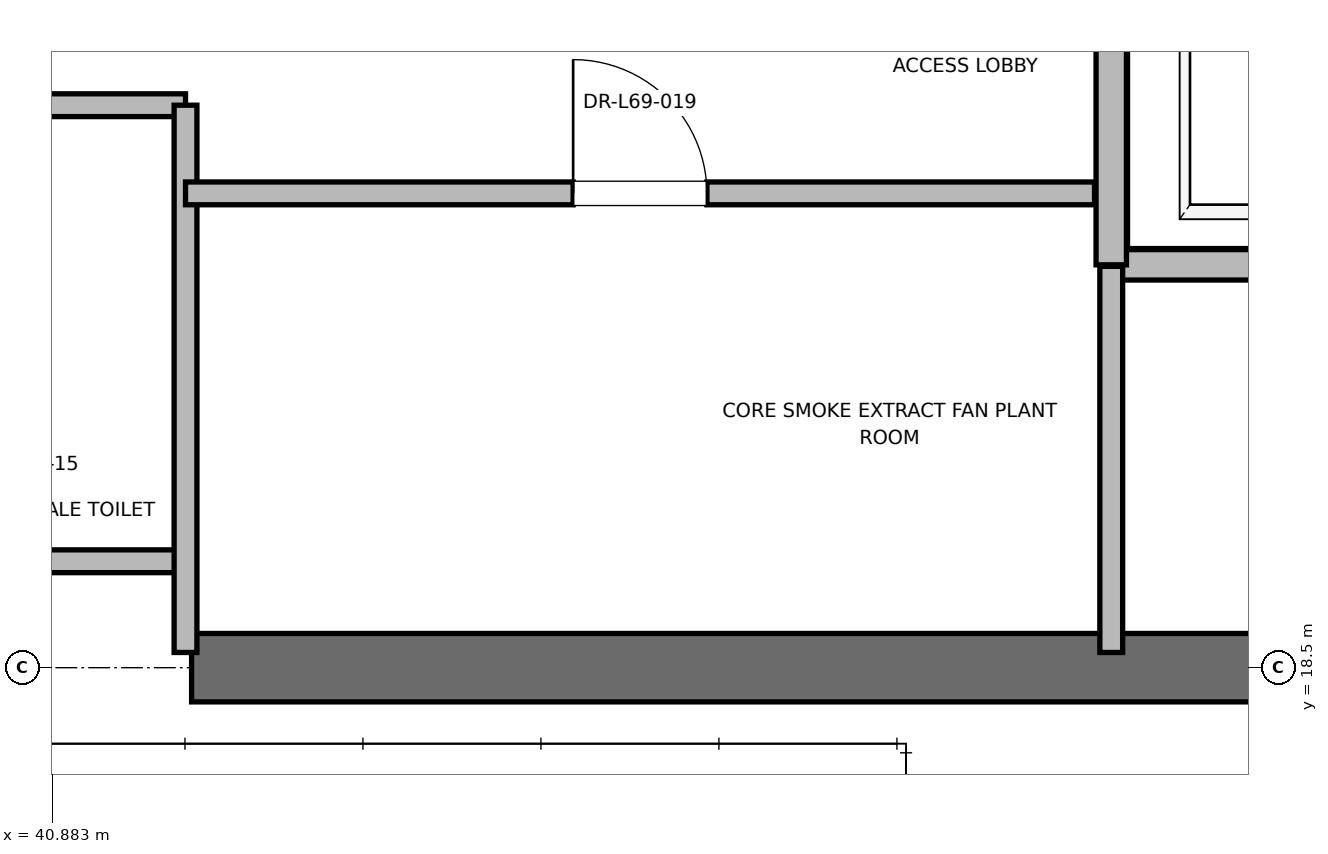
"""IFC4 building model, lengths in metres.
Left out: names, types, materials, properties, quantities, classifications, styles, units other than length and angle.
Written with IfcOpenShell. Run it as: python <this file> out.ifc"""

import sys

from ifc_helpers import new_model, si_unit, direction, frame, frame_2d, origin, place, context, subcontext, project, spatial, rectangle, extrude, element, fill, save


model = new_model("IFC4")
c1 = context("Model", 3, precision=1e-05, world=origin(), true_north=direction((0.0, 1.0)))
c2 = subcontext(c1, "Body", "Model", "MODEL_VIEW")
j1 = project(units=[si_unit("LENGTHUNIT", "METRE"), si_unit("PLANEANGLEUNIT", "RADIAN")], contexts=[c1])
p1 = place(None, origin())
s1 = spatial("IfcSite", under=j1, at=p1, CompositionType="ELEMENT")
p2 = place(p1, origin())
s2 = spatial("IfcBuilding", under=s1, at=p2, CompositionType="ELEMENT")
p3 = place(p2, frame((0.0, 0.0, 295.2)))
s3 = spatial("IfcBuildingStorey", under=s2, at=p3, CompositionType="ELEMENT", Elevation=295.2)
p4 = place(p3, frame((41.8, 18.5, 0.0), z_axis=(0.0, 0.0, 1.0), x_axis=(1.0, 0.0, 0.0)))
e1 = element("IfcWall", 1, at=p4, inside=s3, PredefinedType="SHEAR", context=c2, shape_type="SweptSolid", body=[
    extrude(rectangle(XDim=9.2, YDim=0.45, at=frame_2d((4.6, 0.0))), origin(), (0.0, 0.0, 1.0), 5.5),
])
p5 = place(p3, frame((47.85, 21.15, 0.0), z_axis=(0.0, 0.0, 1.0), x_axis=(1.0, 0.0, 0.0)))
e2 = element("IfcWall", 2, at=p5, inside=s3, PredefinedType="SOLIDWALL", context=c2, shape_type="SweptSolid", body=[
    extrude(rectangle(XDim=2.6, YDim=0.2, at=frame_2d((1.3, 0.0))), origin(), (0.0, 0.0, 1.0), 5.5),
])
p6 = place(p3, frame((47.85, 24.15, 0.0), z_axis=(0.0, 0.0, 1.0), x_axis=(0.0, -1.0, 0.0)))
e3 = element("IfcWall", 3, at=p6, inside=s3, PredefinedType="SOLIDWALL", context=c2, shape_type="SweptSolid", body=[
    extrude(rectangle(XDim=3.0, YDim=0.2, at=frame_2d((1.5, 0.0))), origin(), (0.0, 0.0, 1.0), 5.5),
])
for number, where, z_axis, x_axis in (
    (4, (39.95, 19.2, 0.0), (0.0, 0.0, 1.0), (1.0, 0.0, 0.0)),
    (5, (39.95, 22.2, 0.0), (0.0, 0.0, 1.0), (1.0, 0.0, 0.0)),
):
    element("IfcWall", number, at=place(p3, frame(where, z_axis=z_axis, x_axis=x_axis)), inside=s3, PredefinedType="PARTITIONING", context=c2, shape_type="SweptSolid", body=[
        extrude(rectangle(XDim=1.81, YDim=0.15, at=frame_2d((0.905, 0.0))), origin(), (0.0, 0.0, 1.0), 2.85),
    ])
p7 = place(p3, frame((41.76, 18.6, 0.0), z_axis=(0.0, 0.0, 1.0), x_axis=(0.0, 1.0, 0.0)))
e6 = element("IfcWall", 6, at=p7, inside=s3, PredefinedType="PARTITIONING", context=c2, shape_type="SweptSolid", body=[
    extrude(rectangle(XDim=3.6, YDim=0.15, at=frame_2d((1.8, 0.0))), origin(), (0.0, 0.0, 1.0), 2.85),
])
p8 = place(p3, frame((47.85, 18.6, 0.0), z_axis=(0.0, 0.0, 1.0), x_axis=(0.0, 1.0, 0.0)))
e7 = element("IfcWall", 7, at=p8, inside=s3, PredefinedType="PARTITIONING", context=c2, shape_type="SweptSolid", body=[
    extrude(rectangle(XDim=2.54, YDim=0.15, at=frame_2d((1.27, 0.0))), origin(), (0.0, 0.0, 1.0), 2.85),
])
p9 = place(p3, frame((41.76, 21.62, 0.0), z_axis=(0.0, 0.0, 1.0), x_axis=(1.0, 0.0, 0.0)))
e8 = element("IfcWall", 8, at=p9, inside=s3, PredefinedType="PARTITIONING", context=c2, shape_type="SweptSolid", body=[
    extrude(rectangle(XDim=5.98, YDim=0.15, at=frame_2d((2.99, 0.0))), origin(), (0.0, 0.0, 1.0), 2.85),
])
p10 = place(p9, frame((2.55, 0.0, 0.0)))
e9 = element("IfcOpeningElement", 9, at=p10, cuts=e8, PredefinedType="OPENING", context=c2, shape_type="SweptSolid", body=[
    extrude(rectangle(XDim=0.88, YDim=2.1, at=frame_2d((0.44, 1.05))), frame((0.0, 0.075, 0.0), z_axis=(0.0, -1.0, 0.0), x_axis=(1.0, 0.0, 0.0)), (0.0, 0.0, 1.0), 0.15),
])
p11 = place(p10, origin())
e10 = element("IfcDoor", 10, at=p11, inside=s3, OperationType="SINGLE_SWING_LEFT", PredefinedType="DOOR", context=c2, shape_type="SweptSolid", body=[
    extrude(rectangle(XDim=0.88, YDim=2.1, at=frame_2d((0.44, 1.05))), frame((0.0, 0.025, 0.0), z_axis=(0.0, -1.0, 0.0), x_axis=(1.0, 0.0, 0.0)), (0.0, 0.0, 1.0), 0.05),
])
fill(e9, e10)
save(model, sys.argv[1])
